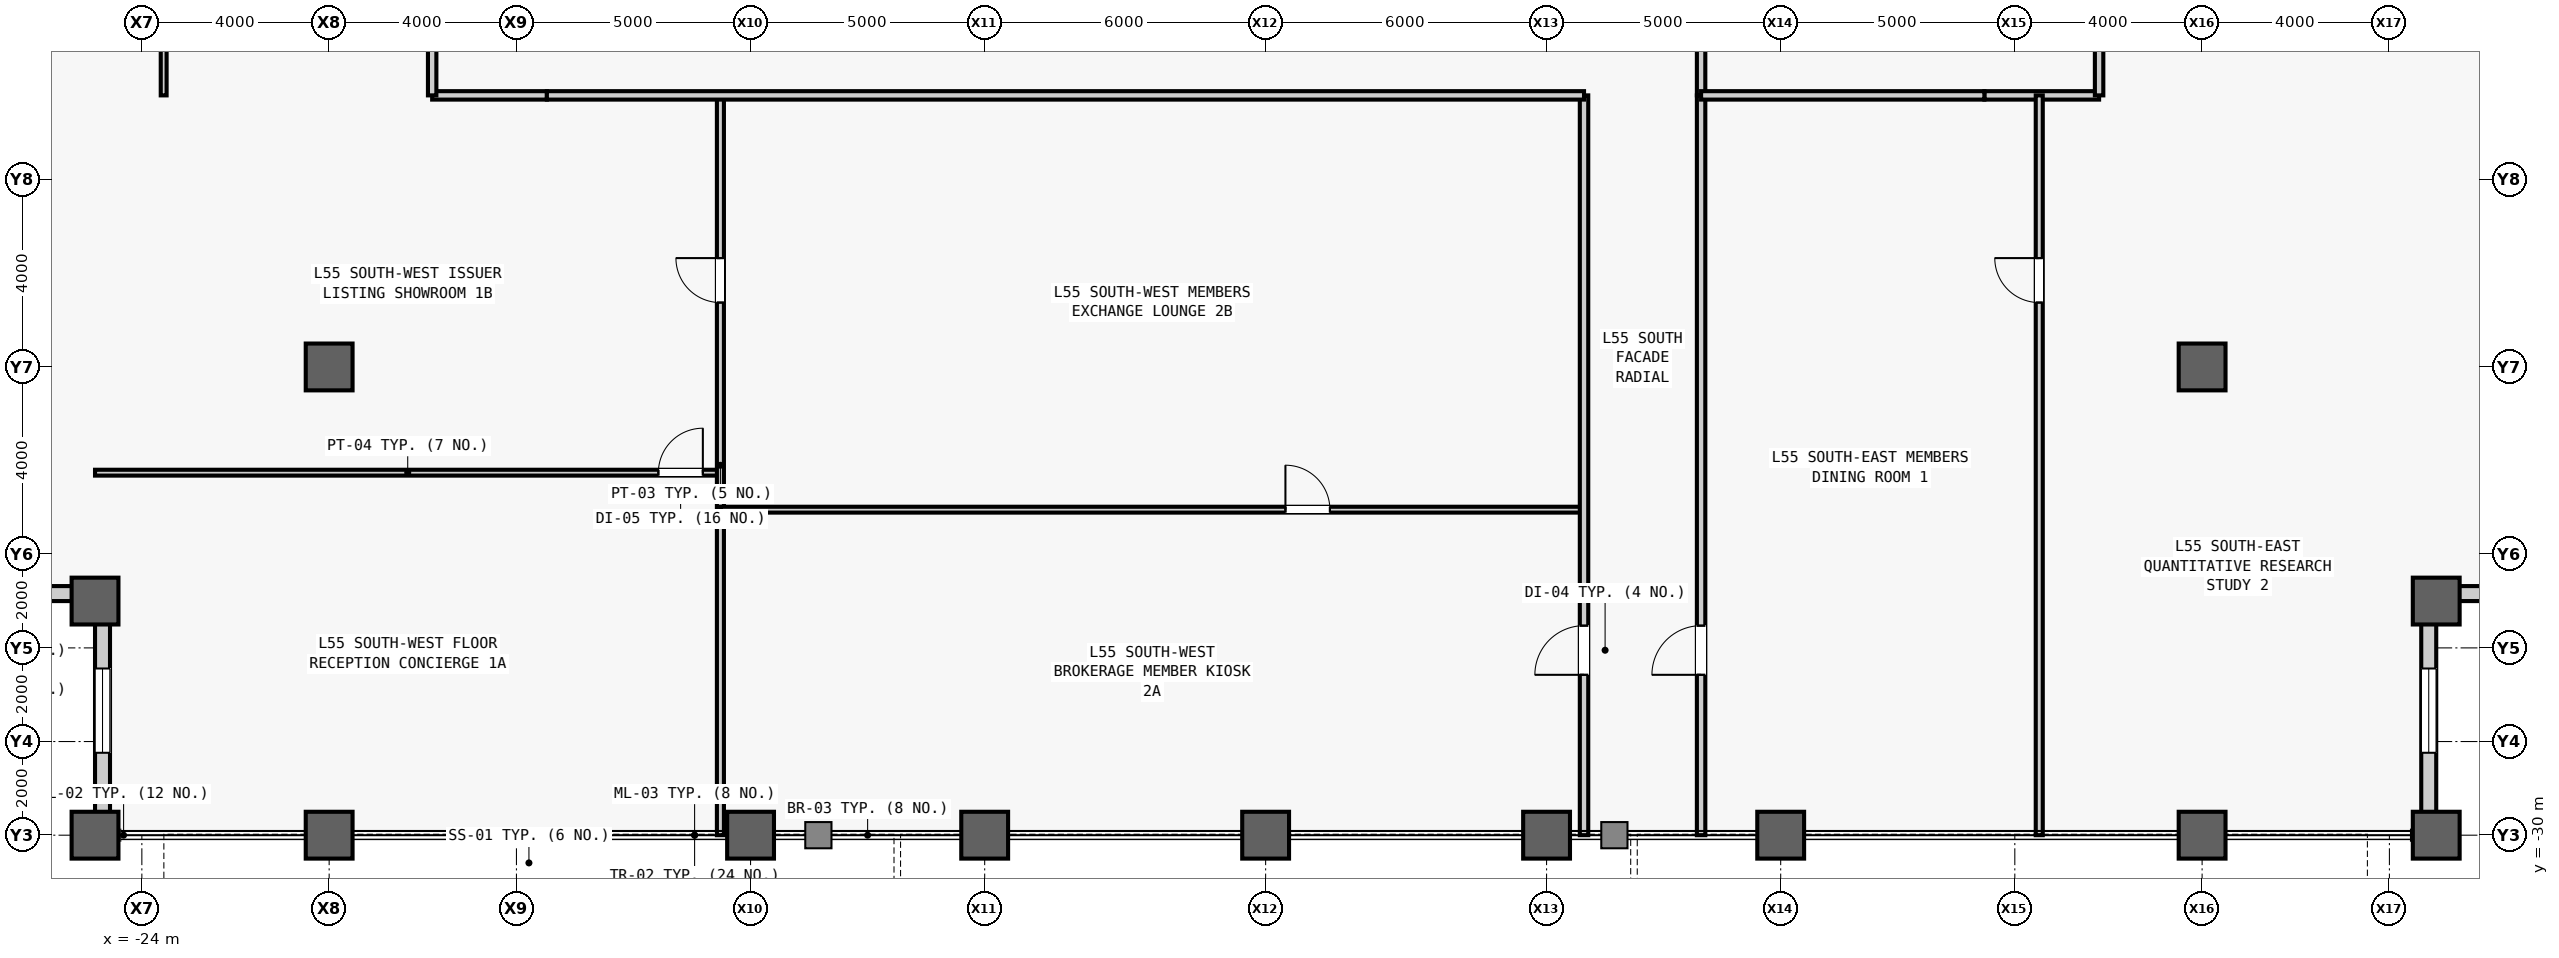
"""IFC4 building model, lengths in metres.
Left out: names, types, materials, properties, quantities, classifications, styles, units other than length and angle.
Written with IfcOpenShell. Run it as: python <this file> out.ifc"""

import sys

from ifc_helpers import new_model, si_unit, direction, frame, frame_2d, origin, origin_2d, place, context, subcontext, project, spatial, rectangle, hollow_rectangle, extrude, source, transform, mapped, element, fill, save


model = new_model("IFC4")
c1 = context("Model", 3, precision=1e-05, world=origin(), true_north=direction((0.0, 1.0)))
c2 = subcontext(c1, "Body", "Model", "MODEL_VIEW")
j1 = project(units=[si_unit("LENGTHUNIT", "METRE"), si_unit("PLANEANGLEUNIT", "RADIAN")], contexts=[c1])
p1 = place(None, origin())
s1 = spatial("IfcSite", under=j1, at=p1, CompositionType="ELEMENT")
p2 = place(p1, origin())
s2 = spatial("IfcBuilding", under=s1, at=p2, CompositionType="ELEMENT")
p3 = place(p2, frame((0.0, 0.0, 235.1)))
s3 = spatial("IfcBuildingStorey", under=s2, at=p3, CompositionType="ELEMENT", Elevation=235.1)
m1 = source(origin(), c2, "Body", "SweptSolid", [
    extrude(hollow_rectangle(XDim=1.0, YDim=1.0, WallThickness=0.055, at=origin_2d()), origin(), (0.0, 0.0, 1.0), 4.0),
])
for number, where, z_axis, x_axis in (
    (1, (-25.0, -30.0, 0.0), (0.0, 0.0, 1.0), (1.0, 0.0, 0.0)),
    (2, (-25.0, -25.0, 0.0), (0.0, 0.0, 1.0), (1.0, 0.0, 0.0)),
    (3, (-20.0, -30.0, 0.0), (0.0, 0.0, 1.0), (1.0, 0.0, 0.0)),
    (4, (-20.0, -20.0, 0.0), (0.0, 0.0, 1.0), (1.0, 0.0, 0.0)),
    (5, (-11.0, -30.0, 0.0), (0.0, 0.0, 1.0), (1.0, 0.0, 0.0)),
    (6, (-6.0, -30.0, 0.0), (0.0, 0.0, 1.0), (1.0, 0.0, 0.0)),
    (7, (0.0, -30.0, 0.0), (0.0, 0.0, 1.0), (1.0, 0.0, 0.0)),
    (8, (6.0, -30.0, 0.0), (0.0, 0.0, 1.0), (1.0, 0.0, 0.0)),
    (9, (11.0, -30.0, 0.0), (0.0, 0.0, 1.0), (1.0, 0.0, 0.0)),
    (10, (20.0, -30.0, 0.0), (0.0, 0.0, 1.0), (1.0, 0.0, 0.0)),
    (11, (20.0, -20.0, 0.0), (0.0, 0.0, 1.0), (1.0, 0.0, 0.0)),
    (12, (25.0, -30.0, 0.0), (0.0, 0.0, 1.0), (1.0, 0.0, 0.0)),
    (13, (25.0, -25.0, 0.0), (0.0, 0.0, 1.0), (1.0, 0.0, 0.0)),
):
    element("IfcColumn", number, at=place(p3, frame(where, z_axis=z_axis, x_axis=x_axis)), inside=s3, PredefinedType="COLUMN", context=c2, shape_type="MappedRepresentation", body=[
        mapped(m1, transform((0.0, 0.0, 0.0), scale=1.0)),
    ])
m2 = source(origin(), c2, "Body", "SweptSolid", [
    extrude(rectangle(XDim=4.68, YDim=0.32, at=frame_2d((2.34, 0.0))), origin(), (0.0, 0.0, 1.0), 3.164),
])
p4 = place(p3, frame((-25.0, -24.84, 0.0), z_axis=(0.0, 0.0, 1.0), x_axis=(-1.0, 0.0, 0.0)))
e14 = element("IfcWall", 14, at=p4, inside=s3, PredefinedType="STANDARD", context=c2, shape_type="MappedRepresentation", body=[
    mapped(m2, transform((0.0, 0.0, 0.0), scale=1.0)),
])
m3 = source(origin(), c2, "Body", "SweptSolid", [
    extrude(rectangle(XDim=1.8, YDim=2.4, at=frame_2d((0.9, 1.2))), frame((0.0, 0.17, 0.0), z_axis=(0.0, -1.0, 0.0), x_axis=(1.0, 0.0, 0.0)), (0.0, 0.0, 1.0), 0.34),
])
p5 = place(p4, frame((1.44, 0.0, 0.5)))
e15 = element("IfcOpeningElement", 15, at=p5, cuts=e14, PredefinedType="OPENING", context=c2, shape_type="MappedRepresentation", body=[
    mapped(m3, transform((0.0, 0.0, 0.0), scale=1.0)),
])
p6 = place(p3, frame((-24.84, -29.68, 0.0), z_axis=(0.0, 0.0, 1.0), x_axis=(0.0, 1.0, 0.0)))
e16 = element("IfcWall", 16, at=p6, inside=s3, PredefinedType="STANDARD", context=c2, shape_type="MappedRepresentation", body=[
    mapped(m2, transform((0.0, 0.0, 0.0), scale=1.0)),
])
p7 = place(p6, frame((1.44, 0.0, 0.5)))
e17 = element("IfcOpeningElement", 17, at=p7, cuts=e16, PredefinedType="OPENING", context=c2, shape_type="MappedRepresentation", body=[
    mapped(m3, transform((0.0, 0.0, 0.0), scale=1.0)),
])
p8 = place(p3, frame((24.84, -29.68, 0.0), z_axis=(0.0, 0.0, 1.0), x_axis=(0.0, 1.0, 0.0)))
e18 = element("IfcWall", 18, at=p8, inside=s3, PredefinedType="STANDARD", context=c2, shape_type="MappedRepresentation", body=[
    mapped(m2, transform((0.0, 0.0, 0.0), scale=1.0)),
])
p9 = place(p8, frame((1.44, 0.0, 0.5)))
e19 = element("IfcOpeningElement", 19, at=p9, cuts=e18, PredefinedType="OPENING", context=c2, shape_type="MappedRepresentation", body=[
    mapped(m3, transform((0.0, 0.0, 0.0), scale=1.0)),
])
p10 = place(p3, frame((25.0, -24.84, 0.0), z_axis=(0.0, 0.0, 1.0), x_axis=(1.0, 0.0, 0.0)))
e20 = element("IfcWall", 20, at=p10, inside=s3, PredefinedType="STANDARD", context=c2, shape_type="MappedRepresentation", body=[
    mapped(m2, transform((0.0, 0.0, 0.0), scale=1.0)),
])
p11 = place(p10, frame((1.44, 0.0, 0.5)))
e21 = element("IfcOpeningElement", 21, at=p11, cuts=e20, PredefinedType="OPENING", context=c2, shape_type="MappedRepresentation", body=[
    mapped(m3, transform((0.0, 0.0, 0.0), scale=1.0)),
])
m4 = source(origin(), c2, "Body", "SweptSolid", [
    extrude(rectangle(XDim=2.45, YDim=0.18, at=frame_2d((1.225, 0.0))), origin(), (0.0, 0.0, 1.0), 3.78),
])
for number, where, z_axis, x_axis in (
    (22, (15.35, -14.2, 0.0), (0.0, 0.0, 1.0), (1.0, 0.0, 0.0)),
    (23, (-17.8, -14.2, 0.0), (0.0, 0.0, 1.0), (1.0, 0.0, 0.0)),
):
    element("IfcWall", number, at=place(p3, frame(where, z_axis=z_axis, x_axis=x_axis)), inside=s3, PredefinedType="PARTITIONING", context=c2, shape_type="MappedRepresentation", body=[
        mapped(m4, transform((0.0, 0.0, 0.0), scale=1.0)),
    ])
m5 = source(origin(), c2, "Body", "SweptSolid", [
    extrude(rectangle(XDim=3.2, YDim=0.18, at=frame_2d((1.6, 0.0))), origin(), (0.0, 0.0, 1.0), 3.78),
])
p12 = place(p3, frame((9.3, -14.2, 0.0), z_axis=(0.0, 0.0, 1.0), x_axis=(0.0, 1.0, 0.0)))
e24 = element("IfcWall", 24, at=p12, inside=s3, PredefinedType="PARTITIONING", context=c2, shape_type="MappedRepresentation", body=[
    mapped(m5, transform((0.0, 0.0, 0.0), scale=1.0)),
])
m6 = source(origin(), c2, "Body", "SweptSolid", [
    extrude(rectangle(XDim=13.356, YDim=0.125, at=frame_2d((6.678, 0.0))), origin(), (0.0, 0.0, 1.0), 3.78),
])
p13 = place(p3, frame((-25.0, -22.258, 0.0), z_axis=(0.0, 0.0, 1.0), x_axis=(1.0, 0.0, 0.0)))
e25 = element("IfcWall", 25, at=p13, inside=s3, PredefinedType="PARTITIONING", context=c2, shape_type="MappedRepresentation", body=[
    mapped(m6, transform((0.0, 0.0, 0.0), scale=1.0)),
])
m7 = source(origin(), c2, "Body", "SweptSolid", [
    extrude(rectangle(XDim=0.95, YDim=2.15, at=frame_2d((0.475, 1.075))), frame((0.0, 0.073, 0.0), z_axis=(0.0, -1.0, 0.0), x_axis=(1.0, 0.0, 0.0)), (0.0, 0.0, 1.0), 0.145),
])
p14 = place(p13, frame((12.031, 0.0, 0.0)))
e26 = element("IfcOpeningElement", 26, at=p14, cuts=e25, PredefinedType="OPENING", context=c2, shape_type="MappedRepresentation", body=[
    mapped(m7, transform((0.0, 0.0, 0.0), scale=1.0)),
])
m8 = source(origin(), c2, "Body", "SweptSolid", [
    extrude(rectangle(XDim=15.8, YDim=0.15, at=frame_2d((7.9, 0.0))), origin(), (0.0, 0.0, 1.0), 3.78),
])
p15 = place(p3, frame((-11.644, -30.0, 0.0), z_axis=(0.0, 0.0, 1.0), x_axis=(0.0, 1.0, 0.0)))
e27 = element("IfcWall", 27, at=p15, inside=s3, PredefinedType="PARTITIONING", context=c2, shape_type="MappedRepresentation", body=[
    mapped(m8, transform((0.0, 0.0, 0.0), scale=1.0)),
])
m9 = source(origin(), c2, "Body", "SweptSolid", [
    extrude(rectangle(XDim=0.95, YDim=2.15, at=frame_2d((0.475, 1.075))), frame((0.0, 0.085, 0.0), z_axis=(0.0, -1.0, 0.0), x_axis=(1.0, 0.0, 0.0)), (0.0, 0.0, 1.0), 0.17),
])
p16 = place(p15, frame((11.375, 0.0, 0.0)))
e28 = element("IfcOpeningElement", 28, at=p16, cuts=e27, PredefinedType="OPENING", context=c2, shape_type="MappedRepresentation", body=[
    mapped(m9, transform((0.0, 0.0, 0.0), scale=1.0)),
])
m10 = source(origin(), c2, "Body", "SweptSolid", [
    extrude(rectangle(XDim=18.444, YDim=0.125, at=frame_2d((9.222, 0.0))), origin(), (0.0, 0.0, 1.0), 3.78),
])
p17 = place(p3, frame((-11.644, -23.048, 0.0), z_axis=(0.0, 0.0, 1.0), x_axis=(1.0, 0.0, 0.0)))
e29 = element("IfcWall", 29, at=p17, inside=s3, PredefinedType="PARTITIONING", context=c2, shape_type="MappedRepresentation", body=[
    mapped(m10, transform((0.0, 0.0, 0.0), scale=1.0)),
])
p18 = place(p17, frame((12.067, 0.0, 0.0)))
e30 = element("IfcOpeningElement", 30, at=p18, cuts=e29, PredefinedType="OPENING", context=c2, shape_type="MappedRepresentation", body=[
    mapped(m7, transform((0.0, 0.0, 0.0), scale=1.0)),
])
m11 = source(origin(), c2, "Body", "SweptSolid", [
    extrude(rectangle(XDim=15.8, YDim=0.18, at=frame_2d((7.9, 0.0))), origin(), (0.0, 0.0, 1.0), 3.78),
])
p19 = place(p3, frame((6.8, -30.0, 0.0), z_axis=(0.0, 0.0, 1.0), x_axis=(0.0, 1.0, 0.0)))
e31 = element("IfcWall", 31, at=p19, inside=s3, PredefinedType="PARTITIONING", context=c2, shape_type="MappedRepresentation", body=[
    mapped(m11, transform((0.0, 0.0, 0.0), scale=1.0)),
])
m12 = source(origin(), c2, "Body", "SweptSolid", [
    extrude(rectangle(XDim=1.05, YDim=2.2, at=frame_2d((0.525, 1.1))), frame((0.0, 0.1, 0.0), z_axis=(0.0, -1.0, 0.0), x_axis=(1.0, 0.0, 0.0)), (0.0, 0.0, 1.0), 0.2),
])
p20 = place(p19, frame((3.425, 0.0, 0.0)))
e32 = element("IfcOpeningElement", 32, at=p20, cuts=e31, PredefinedType="OPENING", context=c2, shape_type="MappedRepresentation", body=[
    mapped(m12, transform((0.0, 0.0, 0.0), scale=1.0)),
])
m13 = source(origin(), c2, "Body", "SweptSolid", [
    extrude(rectangle(XDim=22.15, YDim=0.18, at=frame_2d((11.075, 0.0))), origin(), (0.0, 0.0, 1.0), 3.78),
])
p21 = place(p3, frame((-15.35, -14.2, 0.0), z_axis=(0.0, 0.0, 1.0), x_axis=(1.0, 0.0, 0.0)))
e33 = element("IfcWall", 33, at=p21, inside=s3, PredefinedType="PARTITIONING", context=c2, shape_type="MappedRepresentation", body=[
    mapped(m13, transform((0.0, 0.0, 0.0), scale=1.0)),
])
p22 = place(p3, frame((16.522, -30.0, 0.0), z_axis=(0.0, 0.0, 1.0), x_axis=(0.0, 1.0, 0.0)))
e34 = element("IfcWall", 34, at=p22, inside=s3, PredefinedType="PARTITIONING", context=c2, shape_type="MappedRepresentation", body=[
    mapped(m8, transform((0.0, 0.0, 0.0), scale=1.0)),
])
p23 = place(p22, frame((11.375, 0.0, 0.0)))
e35 = element("IfcOpeningElement", 35, at=p23, cuts=e34, PredefinedType="OPENING", context=c2, shape_type="MappedRepresentation", body=[
    mapped(m9, transform((0.0, 0.0, 0.0), scale=1.0)),
])
p24 = place(p3, frame((9.3, -30.0, 0.0), z_axis=(0.0, 0.0, 1.0), x_axis=(0.0, 1.0, 0.0)))
e36 = element("IfcWall", 36, at=p24, inside=s3, PredefinedType="PARTITIONING", context=c2, shape_type="MappedRepresentation", body=[
    mapped(m11, transform((0.0, 0.0, 0.0), scale=1.0)),
])
p25 = place(p24, frame((3.425, 0.0, 0.0)))
e37 = element("IfcOpeningElement", 37, at=p25, cuts=e36, PredefinedType="OPENING", context=c2, shape_type="MappedRepresentation", body=[
    mapped(m12, transform((0.0, 0.0, 0.0), scale=1.0)),
])
m14 = source(origin(), c2, "Body", "SweptSolid", [
    extrude(rectangle(XDim=6.05, YDim=0.18, at=frame_2d((3.025, 0.0))), origin(), (0.0, 0.0, 1.0), 3.78),
])
p26 = place(p3, frame((9.3, -14.2, 0.0), z_axis=(0.0, 0.0, 1.0), x_axis=(1.0, 0.0, 0.0)))
e38 = element("IfcWall", 38, at=p26, inside=s3, PredefinedType="PARTITIONING", context=c2, shape_type="MappedRepresentation", body=[
    mapped(m14, transform((0.0, 0.0, 0.0), scale=1.0)),
])
m15 = source(origin(), c2, "Body", "SweptSolid", [
    extrude(rectangle(XDim=15.35, YDim=0.125, at=frame_2d((7.675, 0.0))), origin(), (0.0, 0.0, 1.0), 3.78),
])
p27 = place(p3, frame((-23.534, -14.2, 0.0), z_axis=(0.0, 0.0, 1.0), x_axis=(0.0, 1.0, 0.0)))
e39 = element("IfcWall", 39, at=p27, inside=s3, PredefinedType="PARTITIONING", context=c2, shape_type="MappedRepresentation", body=[
    mapped(m15, transform((0.0, 0.0, 0.0), scale=1.0)),
])
m16 = source(origin(), c2, "Body", "SweptSolid", [
    extrude(rectangle(XDim=15.35, YDim=0.18, at=frame_2d((7.675, 0.0))), origin(), (0.0, 0.0, 1.0), 3.78),
])
p28 = place(p3, frame((-17.8, -14.2, 0.0), z_axis=(0.0, 0.0, 1.0), x_axis=(0.0, 1.0, 0.0)))
e40 = element("IfcWall", 40, at=p28, inside=s3, PredefinedType="PARTITIONING", context=c2, shape_type="MappedRepresentation", body=[
    mapped(m16, transform((0.0, 0.0, 0.0), scale=1.0)),
])
m17 = source(origin(), c2, "Body", "SweptSolid", [
    extrude(rectangle(XDim=12.65, YDim=0.18, at=frame_2d((6.325, 0.0))), origin(), (0.0, 0.0, 1.0), 3.78),
])
p29 = place(p3, frame((17.8, -14.2, 0.0), z_axis=(0.0, 0.0, 1.0), x_axis=(0.0, 1.0, 0.0)))
e41 = element("IfcWall", 41, at=p29, inside=s3, PredefinedType="PARTITIONING", context=c2, shape_type="MappedRepresentation", body=[
    mapped(m17, transform((0.0, 0.0, 0.0), scale=1.0)),
])
m18 = source(origin(), c2, "Body", "SweptSolid", [
    extrude(rectangle(XDim=1.8, YDim=2.4, at=frame_2d((0.9, 1.2))), frame((0.0, 0.03, 0.0), z_axis=(0.0, -1.0, 0.0), x_axis=(1.0, 0.0, 0.0)), (0.0, 0.0, 1.0), 0.06),
])
p30 = place(p7, origin())
e42 = element("IfcWindow", 42, at=p30, inside=s3, PartitioningType="SINGLE_PANEL", PredefinedType="WINDOW", context=c2, shape_type="MappedRepresentation", body=[
    mapped(m18, transform((0.0, 0.0, 0.0), scale=1.0)),
])
fill(e17, e42)
p31 = place(p9, origin())
e43 = element("IfcWindow", 43, at=p31, inside=s3, PartitioningType="SINGLE_PANEL", PredefinedType="WINDOW", context=c2, shape_type="MappedRepresentation", body=[
    mapped(m18, transform((0.0, 0.0, 0.0), scale=1.0)),
])
fill(e19, e43)
m19 = source(origin(), c2, "Body", "SweptSolid", [
    extrude(rectangle(XDim=0.95, YDim=2.15, at=frame_2d((0.475, 1.075))), frame((0.0, 0.025, 0.0), z_axis=(0.0, -1.0, 0.0), x_axis=(1.0, 0.0, 0.0)), (0.0, 0.0, 1.0), 0.05),
])
p32 = place(p14, origin())
e44 = element("IfcDoor", 44, at=p32, inside=s3, OperationType="SINGLE_SWING_RIGHT", PredefinedType="DOOR", context=c2, shape_type="MappedRepresentation", body=[
    mapped(m19, transform((0.0, 0.0, 0.0), scale=1.0)),
])
fill(e26, e44)
p33 = place(p16, origin())
e45 = element("IfcDoor", 45, at=p33, inside=s3, OperationType="SINGLE_SWING_RIGHT", PredefinedType="DOOR", context=c2, shape_type="MappedRepresentation", body=[
    mapped(m19, transform((0.0, 0.0, 0.0), scale=1.0)),
])
fill(e28, e45)
p34 = place(p18, origin())
e46 = element("IfcDoor", 46, at=p34, inside=s3, OperationType="SINGLE_SWING_LEFT", PredefinedType="DOOR", context=c2, shape_type="MappedRepresentation", body=[
    mapped(m19, transform((0.0, 0.0, 0.0), scale=1.0)),
])
fill(e30, e46)
m20 = source(origin(), c2, "Body", "SweptSolid", [
    extrude(rectangle(XDim=1.05, YDim=2.2, at=frame_2d((0.525, 1.1))), frame((0.0, 0.025, 0.0), z_axis=(0.0, -1.0, 0.0), x_axis=(1.0, 0.0, 0.0)), (0.0, 0.0, 1.0), 0.05),
])
p35 = place(p20, origin())
e47 = element("IfcDoor", 47, at=p35, inside=s3, OperationType="SINGLE_SWING_LEFT", PredefinedType="DOOR", context=c2, shape_type="MappedRepresentation", body=[
    mapped(m20, transform((0.0, 0.0, 0.0), scale=1.0)),
])
fill(e32, e47)
p36 = place(p23, origin())
e48 = element("IfcDoor", 48, at=p36, inside=s3, OperationType="SINGLE_SWING_RIGHT", PredefinedType="DOOR", context=c2, shape_type="MappedRepresentation", body=[
    mapped(m19, transform((0.0, 0.0, 0.0), scale=1.0)),
])
fill(e35, e48)
p37 = place(p25, origin())
e49 = element("IfcDoor", 49, at=p37, inside=s3, OperationType="SINGLE_SWING_LEFT", PredefinedType="DOOR", context=c2, shape_type="MappedRepresentation", body=[
    mapped(m20, transform((0.0, 0.0, 0.0), scale=1.0)),
])
fill(e37, e49)
save(model, sys.argv[1])
